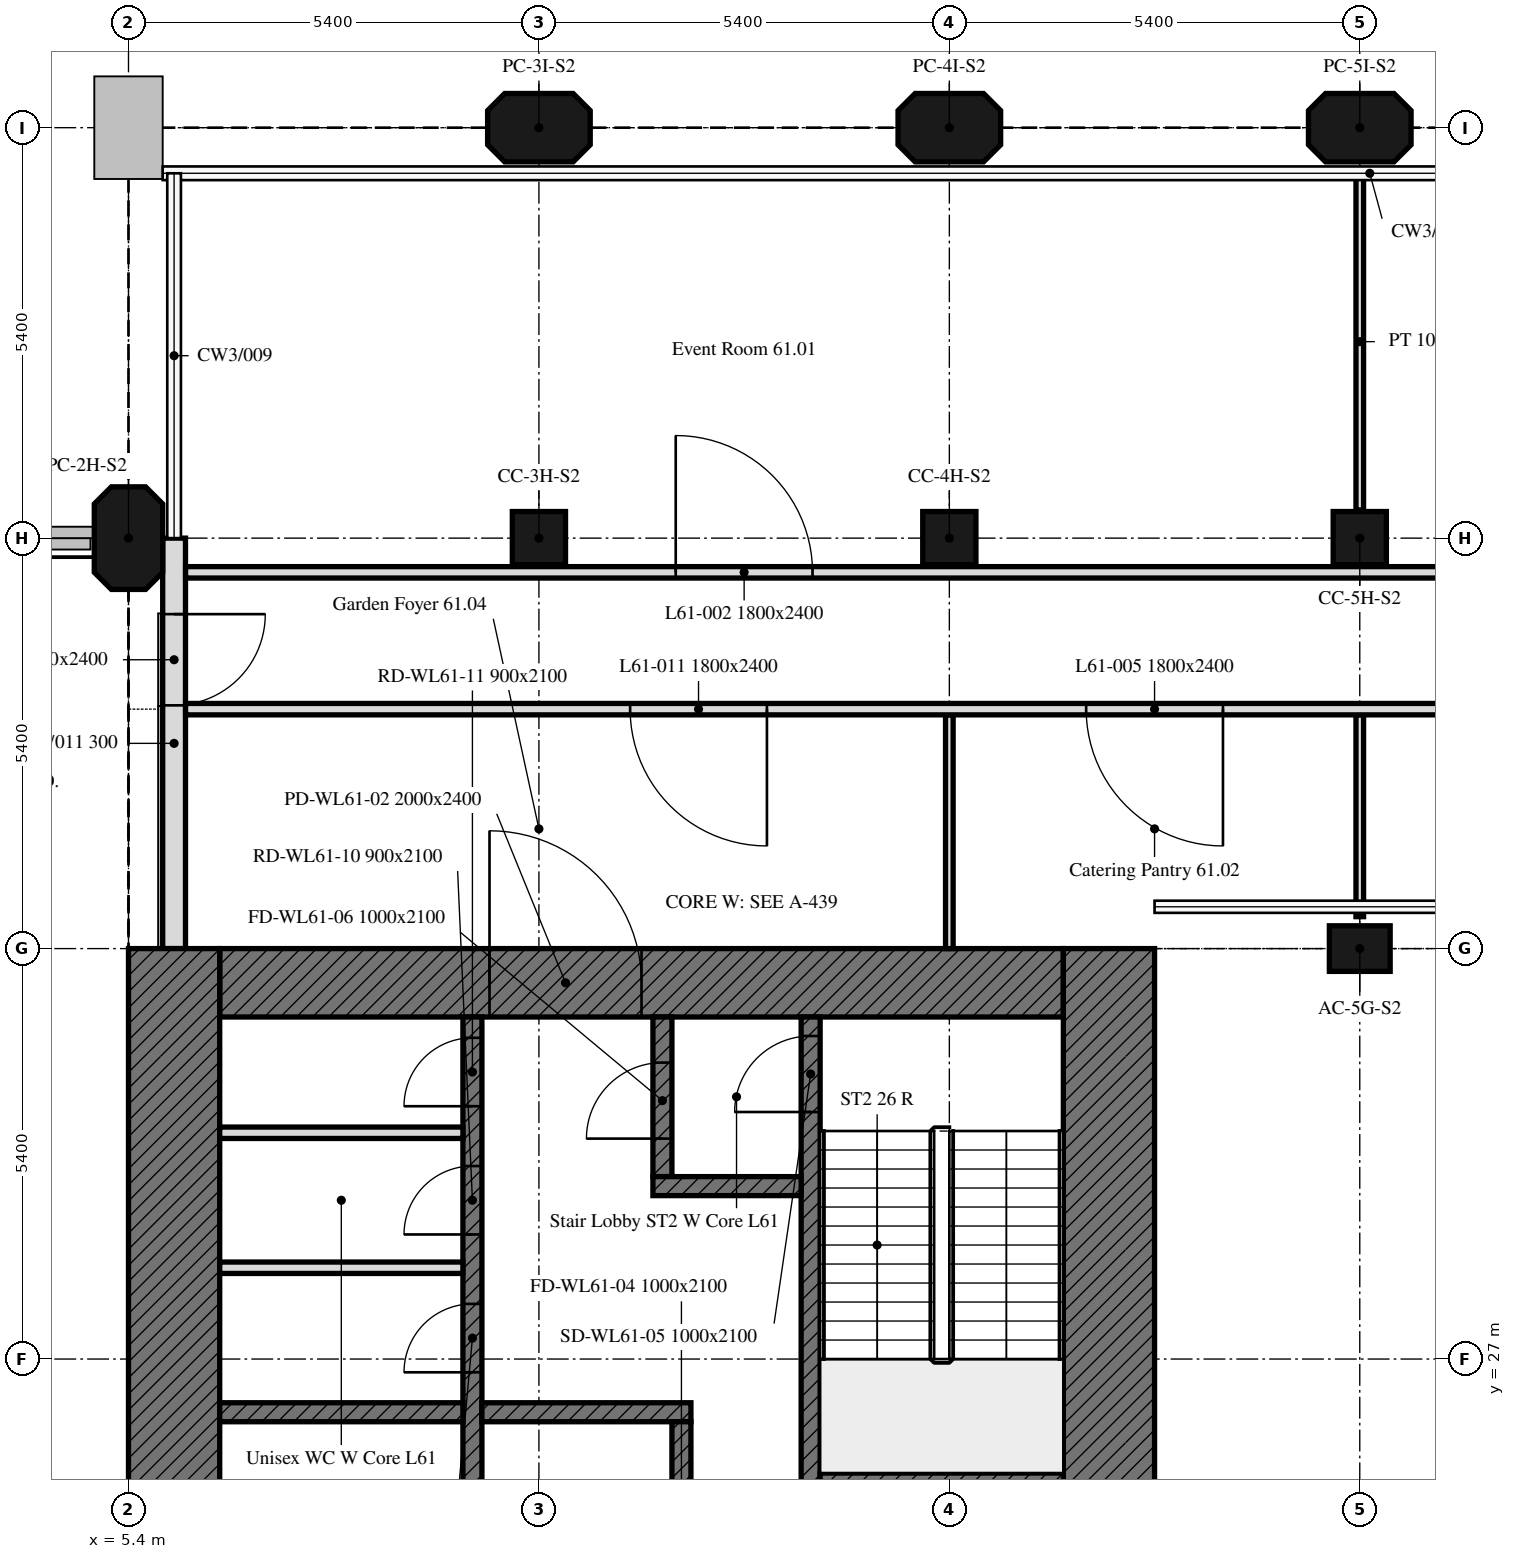
"""IFC4 building model, lengths in metres.
Left out: names, types, materials, properties, quantities, classifications, styles, units other than length and angle.
Written with IfcOpenShell. Run it as: python <this file> out.ifc"""

import sys

from ifc_helpers import new_model, si_unit, direction, frame, frame_2d, origin, origin_2d, place, context, subcontext, project, spatial, polyline, rectangle, outline, extrude, element, fill, save


model = new_model("IFC4")
c1 = context("Model", 3, precision=1e-05, world=origin(), true_north=direction((0.0, 1.0)))
c2 = subcontext(c1, "Body", "Model", "MODEL_VIEW")
j1 = project(units=[si_unit("LENGTHUNIT", "METRE"), si_unit("PLANEANGLEUNIT", "RADIAN")], contexts=[c1])
p1 = place(None, origin())
s1 = spatial("IfcSite", under=j1, at=p1, CompositionType="ELEMENT")
p2 = place(p1, origin())
s2 = spatial("IfcBuilding", under=s1, at=p2, CompositionType="ELEMENT")
p3 = place(p2, frame((0.0, 0.0, 250.9)))
s3 = spatial("IfcBuildingStorey", under=s2, at=p3, CompositionType="ELEMENT", Elevation=250.9)
p4 = place(p3, frame((21.6, 32.4, 0.0), z_axis=(0.0, 0.0, 1.0), x_axis=(1.0, 0.0, 0.0)))
e1 = element("IfcColumn", 1, at=p4, inside=s3, PredefinedType="COLUMN", context=c2, shape_type="SweptSolid", body=[
    extrude(rectangle(XDim=0.8, YDim=0.6, at=origin_2d()), origin(), (0.0, 0.0, 1.0), 4.5),
])
p5 = place(p3, frame((5.4, 37.8, 0.0), z_axis=(0.0, 0.0, 1.0), x_axis=(0.0, 1.0, 0.0)))
e2 = element("IfcColumn", 2, at=p5, inside=s3, PredefinedType="COLUMN", context=c2, shape_type="SweptSolid", body=[
    extrude(outline(polyline([(-0.45, -0.45), (0.45, -0.45), (0.675, -0.225), (0.675, 0.225), (0.45, 0.45), (-0.45, 0.45), (-0.675, 0.225), (-0.675, -0.225), (-0.45, -0.45)])), origin(), (0.0, 0.0, 1.0), 4.5),
])
for number, where, z_axis, x_axis in (
    (3, (10.8, 37.8, 0.0), (0.0, 0.0, 1.0), (1.0, 0.0, 0.0)),
    (4, (16.2, 37.8, 0.0), (0.0, 0.0, 1.0), (1.0, 0.0, 0.0)),
    (5, (21.6, 37.8, 0.0), (0.0, 0.0, 1.0), (1.0, 0.0, 0.0)),
):
    element("IfcColumn", number, at=place(p3, frame(where, z_axis=z_axis, x_axis=x_axis)), inside=s3, PredefinedType="COLUMN", context=c2, shape_type="SweptSolid", body=[
        extrude(rectangle(XDim=0.7, YDim=0.7, at=origin_2d()), origin(), (0.0, 0.0, 1.0), 4.5),
    ])
for number, where, z_axis, x_axis in (
    (6, (10.8, 43.2, 0.0), (0.0, 0.0, 1.0), (1.0, 0.0, 0.0)),
    (7, (16.2, 43.2, 0.0), (0.0, 0.0, 1.0), (1.0, 0.0, 0.0)),
    (8, (21.6, 43.2, 0.0), (0.0, 0.0, 1.0), (1.0, 0.0, 0.0)),
):
    element("IfcColumn", number, at=place(p3, frame(where, z_axis=z_axis, x_axis=x_axis)), inside=s3, PredefinedType="COLUMN", context=c2, shape_type="SweptSolid", body=[
        extrude(outline(polyline([(-0.45, -0.45), (0.45, -0.45), (0.675, -0.225), (0.675, 0.225), (0.45, 0.45), (-0.45, 0.45), (-0.675, 0.225), (-0.675, -0.225), (-0.45, -0.45)])), origin(), (0.0, 0.0, 1.0), 4.5),
    ])
p6 = place(p3, frame((6.0, 37.8, 0.0), z_axis=(0.0, 0.0, 1.0), x_axis=(0.0, -1.0, 0.0)))
e9 = element("IfcWall", 9, at=p6, inside=s3, PredefinedType="SOLIDWALL", context=c2, shape_type="SweptSolid", body=[
    extrude(rectangle(XDim=5.4, YDim=0.3, at=frame_2d((2.7, 0.0))), origin(), (0.0, 0.0, 1.0), 4.5),
])
p7 = place(p6, frame((1.0, 0.0, 0.0)))
e10 = element("IfcOpeningElement", 10, at=p7, cuts=e9, PredefinedType="OPENING", context=c2, shape_type="SweptSolid", body=[
    extrude(rectangle(XDim=1.2, YDim=2.4, at=frame_2d((0.6, 1.2))), frame((0.0, 0.16, 0.0), z_axis=(0.0, -1.0, 0.0), x_axis=(1.0, 0.0, 0.0)), (0.0, 0.0, 1.0), 0.32),
])
p8 = place(p3, frame((6.6, 31.95, 0.0), z_axis=(0.0, 0.0, 1.0), x_axis=(1.0, 0.0, 0.0)))
e11 = element("IfcWall", 11, at=p8, inside=s3, PredefinedType="SOLIDWALL", context=c2, shape_type="SweptSolid", body=[
    extrude(rectangle(XDim=11.1, YDim=0.9, at=frame_2d((5.55, 0.0))), origin(), (0.0, 0.0, 1.0), 4.5),
])
p9 = place(p8, frame((3.55, 0.0, 0.0)))
e12 = element("IfcOpeningElement", 12, at=p9, cuts=e11, PredefinedType="OPENING", context=c2, shape_type="SweptSolid", body=[
    extrude(rectangle(XDim=2.0, YDim=2.4, at=frame_2d((1.0, 1.2))), frame((0.0, 0.45, 0.0), z_axis=(0.0, -1.0, 0.0), x_axis=(1.0, 0.0, 0.0)), (0.0, 0.0, 1.0), 0.9),
])
for number, where, z_axis, x_axis in (
    (13, (6.0, 16.2, 0.0), (0.0, 0.0, 1.0), (0.0, 1.0, 0.0)),
    (14, (18.3, 32.4, 0.0), (0.0, 0.0, 1.0), (0.0, -1.0, 0.0)),
):
    element("IfcWall", number, at=place(p3, frame(where, z_axis=z_axis, x_axis=x_axis)), inside=s3, PredefinedType="SOLIDWALL", context=c2, shape_type="SweptSolid", body=[
        extrude(rectangle(XDim=16.2, YDim=1.2, at=frame_2d((8.1, 0.0))), origin(), (0.0, 0.0, 1.0), 4.5),
    ])
p10 = place(p3, frame((9.925, 17.1, 0.0), z_axis=(0.0, 0.0, 1.0), x_axis=(0.0, 1.0, 0.0)))
e15 = element("IfcWall", 15, at=p10, inside=s3, PredefinedType="SOLIDWALL", context=c2, shape_type="SweptSolid", body=[
    extrude(rectangle(XDim=14.4, YDim=0.25, at=frame_2d((7.2, 0.0))), origin(), (0.0, 0.0, 1.0), 4.5),
])
p11 = place(p10, frame((4.6, 0.0, 0.0)))
e16 = element("IfcOpeningElement", 16, at=p11, cuts=e15, PredefinedType="OPENING", context=c2, shape_type="SweptSolid", body=[
    extrude(rectangle(XDim=1.0, YDim=2.1, at=frame_2d((0.5, 1.05))), frame((0.0, 0.125, 0.0), z_axis=(0.0, -1.0, 0.0), x_axis=(1.0, 0.0, 0.0)), (0.0, 0.0, 1.0), 0.25),
])
p12 = place(p10, frame((7.062, 0.0, 0.0)))
e17 = element("IfcOpeningElement", 17, at=p12, cuts=e15, PredefinedType="OPENING", context=c2, shape_type="SweptSolid", body=[
    extrude(rectangle(XDim=1.2, YDim=2.1, at=frame_2d((0.6, 1.05))), frame((0.0, 0.125, 0.0), z_axis=(0.0, -1.0, 0.0), x_axis=(1.0, 0.0, 0.0)), (0.0, 0.0, 1.0), 0.25),
])
p13 = place(p10, frame((9.726, 0.0, 0.0)))
e18 = element("IfcOpeningElement", 18, at=p13, cuts=e15, PredefinedType="OPENING", context=c2, shape_type="SweptSolid", body=[
    extrude(rectangle(XDim=0.9, YDim=2.1, at=frame_2d((0.45, 1.05))), frame((0.0, 0.125, 0.0), z_axis=(0.0, -1.0, 0.0), x_axis=(1.0, 0.0, 0.0)), (0.0, 0.0, 1.0), 0.25),
])
p14 = place(p10, frame((11.539, 0.0, 0.0)))
e19 = element("IfcOpeningElement", 19, at=p14, cuts=e15, PredefinedType="OPENING", context=c2, shape_type="SweptSolid", body=[
    extrude(rectangle(XDim=0.9, YDim=2.1, at=frame_2d((0.45, 1.05))), frame((0.0, 0.125, 0.0), z_axis=(0.0, -1.0, 0.0), x_axis=(1.0, 0.0, 0.0)), (0.0, 0.0, 1.0), 0.25),
])
p15 = place(p10, frame((13.226, 0.0, 0.0)))
e20 = element("IfcOpeningElement", 20, at=p15, cuts=e15, PredefinedType="OPENING", context=c2, shape_type="SweptSolid", body=[
    extrude(rectangle(XDim=0.9, YDim=2.1, at=frame_2d((0.45, 1.05))), frame((0.0, 0.125, 0.0), z_axis=(0.0, -1.0, 0.0), x_axis=(1.0, 0.0, 0.0)), (0.0, 0.0, 1.0), 0.25),
])
p16 = place(p3, frame((14.375, 17.1, 0.0), z_axis=(0.0, 0.0, 1.0), x_axis=(0.0, 1.0, 0.0)))
e21 = element("IfcWall", 21, at=p16, inside=s3, PredefinedType="SOLIDWALL", context=c2, shape_type="SweptSolid", body=[
    extrude(rectangle(XDim=14.4, YDim=0.25, at=frame_2d((7.2, 0.0))), origin(), (0.0, 0.0, 1.0), 4.5),
])
p17 = place(p16, frame((13.15, 0.0, 0.0)))
e22 = element("IfcOpeningElement", 22, at=p17, cuts=e21, PredefinedType="OPENING", context=c2, shape_type="SweptSolid", body=[
    extrude(rectangle(XDim=1.0, YDim=2.1, at=frame_2d((0.5, 1.05))), frame((0.0, 0.125, 0.0), z_axis=(0.0, -1.0, 0.0), x_axis=(1.0, 0.0, 0.0)), (0.0, 0.0, 1.0), 0.25),
])
p18 = place(p16, frame((3.15, 0.0, 0.0)))
e23 = element("IfcOpeningElement", 23, at=p18, cuts=e21, PredefinedType="OPENING", context=c2, shape_type="SweptSolid", body=[
    extrude(rectangle(XDim=1.1, YDim=2.1, at=frame_2d((0.55, 1.05))), frame((0.0, 0.125, 0.0), z_axis=(0.0, -1.0, 0.0), x_axis=(1.0, 0.0, 0.0)), (0.0, 0.0, 1.0), 0.25),
])
p19 = place(p16, frame((0.7, 0.0, 0.0)))
e24 = element("IfcOpeningElement", 24, at=p19, cuts=e21, PredefinedType="OPENING", context=c2, shape_type="SweptSolid", body=[
    extrude(rectangle(XDim=0.9, YDim=2.1, at=frame_2d((0.45, 1.05))), frame((0.0, 0.125, 0.0), z_axis=(0.0, -1.0, 0.0), x_axis=(1.0, 0.0, 0.0)), (0.0, 0.0, 1.0), 0.25),
])
p20 = place(p16, frame((6.175, 0.0, 0.0)))
e25 = element("IfcOpeningElement", 25, at=p20, cuts=e21, PredefinedType="OPENING", context=c2, shape_type="SweptSolid", body=[
    extrude(rectangle(XDim=0.9, YDim=2.1, at=frame_2d((0.45, 1.05))), frame((0.0, 0.125, 0.0), z_axis=(0.0, -1.0, 0.0), x_axis=(1.0, 0.0, 0.0)), (0.0, 0.0, 1.0), 0.25),
])
for number, where, z_axis, x_axis in (
    (26, (14.5, 25.375, 0.0), (0.0, 0.0, 1.0), (1.0, 0.0, 0.0)),
    (27, (6.6, 26.3, 0.0), (0.0, 0.0, 1.0), (1.0, 0.0, 0.0)),
):
    element("IfcWall", number, at=place(p3, frame(where, z_axis=z_axis, x_axis=x_axis)), inside=s3, PredefinedType="SOLIDWALL", context=c2, shape_type="SweptSolid", body=[
        extrude(rectangle(XDim=3.2, YDim=0.25, at=frame_2d((1.6, 0.0))), origin(), (0.0, 0.0, 1.0), 4.5),
    ])
p21 = place(p3, frame((10.05, 26.3, 0.0), z_axis=(0.0, 0.0, 1.0), x_axis=(1.0, 0.0, 0.0)))
e28 = element("IfcWall", 28, at=p21, inside=s3, PredefinedType="SOLIDWALL", context=c2, shape_type="SweptSolid", body=[
    extrude(rectangle(XDim=2.75, YDim=0.25, at=frame_2d((1.375, 0.0))), origin(), (0.0, 0.0, 1.0), 4.5),
])
p22 = place(p3, frame((12.425, 29.4, 0.0), z_axis=(0.0, 0.0, 1.0), x_axis=(0.0, 1.0, 0.0)))
e29 = element("IfcWall", 29, at=p22, inside=s3, PredefinedType="SOLIDWALL", context=c2, shape_type="SweptSolid", body=[
    extrude(rectangle(XDim=2.1, YDim=0.25, at=frame_2d((1.05, 0.0))), origin(), (0.0, 0.0, 1.0), 4.5),
])
p23 = place(p22, frame((0.5, 0.0, 0.0)))
e30 = element("IfcOpeningElement", 30, at=p23, cuts=e29, PredefinedType="OPENING", context=c2, shape_type="SweptSolid", body=[
    extrude(rectangle(XDim=1.0, YDim=2.1, at=frame_2d((0.5, 1.05))), frame((0.0, 0.125, 0.0), z_axis=(0.0, -1.0, 0.0), x_axis=(1.0, 0.0, 0.0)), (0.0, 0.0, 1.0), 0.25),
])
p24 = place(p3, frame((12.3, 29.275, 0.0), z_axis=(0.0, 0.0, 1.0), x_axis=(1.0, 0.0, 0.0)))
e31 = element("IfcWall", 31, at=p24, inside=s3, PredefinedType="SOLIDWALL", context=c2, shape_type="SweptSolid", body=[
    extrude(rectangle(XDim=1.95, YDim=0.25, at=frame_2d((0.975, 0.0))), origin(), (0.0, 0.0, 1.0), 4.5),
])
p25 = place(p3, frame((12.675, 20.55, 0.0), z_axis=(0.0, 0.0, 1.0), x_axis=(0.0, 1.0, 0.0)))
e32 = element("IfcWall", 32, at=p25, inside=s3, PredefinedType="SOLIDWALL", context=c2, shape_type="SweptSolid", body=[
    extrude(rectangle(XDim=5.625, YDim=0.25, at=frame_2d((2.812, 0.0))), origin(), (0.0, 0.0, 1.0), 4.5),
])
p26 = place(p25, frame((2.95, 0.0, 0.0)))
e33 = element("IfcOpeningElement", 33, at=p26, cuts=e32, PredefinedType="OPENING", context=c2, shape_type="SweptSolid", body=[
    extrude(rectangle(XDim=1.0, YDim=2.1, at=frame_2d((0.5, 1.05))), frame((0.0, 0.125, 0.0), z_axis=(0.0, -1.0, 0.0), x_axis=(1.0, 0.0, 0.0)), (0.0, 0.0, 1.0), 0.25),
])
for number, where, z_axis, x_axis in (
    (34, (6.6, 28.201, 0.0), (0.0, 0.0, 1.0), (1.0, 0.0, 0.0)),
    (35, (6.6, 29.977, 0.0), (0.0, 0.0, 1.0), (1.0, 0.0, 0.0)),
):
    element("IfcWall", number, at=place(p3, frame(where, z_axis=z_axis, x_axis=x_axis)), inside=s3, PredefinedType="PARTITIONING", context=c2, shape_type="SweptSolid", body=[
        extrude(rectangle(XDim=3.2, YDim=0.15, at=frame_2d((1.6, 0.0))), origin(), (0.0, 0.0, 1.0), 4.5),
    ])
p27 = place(p3, frame((21.6, 42.6, 0.0), z_axis=(0.0, 0.0, 1.0), x_axis=(0.0, -1.0, 0.0)))
e36 = element("IfcWall", 36, at=p27, inside=s3, PredefinedType="PARTITIONING", context=c2, shape_type="SweptSolid", body=[
    extrude(rectangle(XDim=4.43, YDim=0.1, at=frame_2d((2.215, 0.0))), origin(), (0.0, 0.0, 1.0), 3.75),
])
p28 = place(p3, frame((6.151, 37.35, 0.0), z_axis=(0.0, 0.0, 1.0), x_axis=(1.0, 0.0, 0.0)))
e37 = element("IfcWall", 37, at=p28, inside=s3, PredefinedType="PARTITIONING", context=c2, shape_type="SweptSolid", body=[
    extrude(rectangle(XDim=31.198, YDim=0.15, at=frame_2d((15.599, 0.0))), origin(), (0.0, 0.0, 1.0), 3.75),
])
p29 = place(p28, frame((6.449, 0.0, 0.0)))
e38 = element("IfcOpeningElement", 38, at=p29, cuts=e37, PredefinedType="OPENING", context=c2, shape_type="SweptSolid", body=[
    extrude(rectangle(XDim=1.8, YDim=2.4, at=frame_2d((0.9, 1.2))), frame((0.0, 0.075, 0.0), z_axis=(0.0, -1.0, 0.0), x_axis=(1.0, 0.0, 0.0)), (0.0, 0.0, 1.0), 0.15),
])
p30 = place(p3, frame((21.6, 35.475, 0.0), z_axis=(0.0, 0.0, 1.0), x_axis=(0.0, -1.0, 0.0)))
e39 = element("IfcWall", 39, at=p30, inside=s3, PredefinedType="PARTITIONING", context=c2, shape_type="SweptSolid", body=[
    extrude(rectangle(XDim=2.655, YDim=0.1, at=frame_2d((1.328, 0.0))), origin(), (0.0, 0.0, 1.0), 3.75),
])
p31 = place(p3, frame((16.2, 35.475, 0.0), z_axis=(0.0, 0.0, 1.0), x_axis=(0.0, -1.0, 0.0)))
e40 = element("IfcWall", 40, at=p31, inside=s3, PredefinedType="PARTITIONING", context=c2, shape_type="SweptSolid", body=[
    extrude(rectangle(XDim=3.075, YDim=0.1, at=frame_2d((1.538, 0.0))), origin(), (0.0, 0.0, 1.0), 3.75),
])
p32 = place(p3, frame((42.6, 35.55, 0.0), z_axis=(0.0, 0.0, 1.0), x_axis=(-1.0, 0.0, 0.0)))
e41 = element("IfcWall", 41, at=p32, inside=s3, PredefinedType="PARTITIONING", context=c2, shape_type="SweptSolid", body=[
    extrude(rectangle(XDim=36.449, YDim=0.15, at=frame_2d((18.225, 0.0))), origin(), (0.0, 0.0, 1.0), 3.75),
])
p33 = place(p32, frame((12.0, 0.0, 0.0)))
e42 = element("IfcOpeningElement", 42, at=p33, cuts=e41, PredefinedType="OPENING", context=c2, shape_type="SweptSolid", body=[
    extrude(rectangle(XDim=1.8, YDim=2.4, at=frame_2d((0.9, 1.2))), frame((0.0, 0.075, 0.0), z_axis=(0.0, -1.0, 0.0), x_axis=(1.0, 0.0, 0.0)), (0.0, 0.0, 1.0), 0.15),
])
p34 = place(p32, frame((17.4, 0.0, 0.0)))
e43 = element("IfcOpeningElement", 43, at=p34, cuts=e41, PredefinedType="OPENING", context=c2, shape_type="SweptSolid", body=[
    extrude(rectangle(XDim=1.8, YDim=2.4, at=frame_2d((0.9, 1.2))), frame((0.0, 0.075, 0.0), z_axis=(0.0, -1.0, 0.0), x_axis=(1.0, 0.0, 0.0)), (0.0, 0.0, 1.0), 0.15),
])
p35 = place(p32, frame((22.8, 0.0, 0.0)))
e44 = element("IfcOpeningElement", 44, at=p35, cuts=e41, PredefinedType="OPENING", context=c2, shape_type="SweptSolid", body=[
    extrude(rectangle(XDim=1.8, YDim=2.4, at=frame_2d((0.9, 1.2))), frame((0.0, 0.075, 0.0), z_axis=(0.0, -1.0, 0.0), x_axis=(1.0, 0.0, 0.0)), (0.0, 0.0, 1.0), 0.15),
])
p36 = place(p32, frame((1.8, 0.0, 0.0)))
e45 = element("IfcOpeningElement", 45, at=p36, cuts=e41, PredefinedType="OPENING", context=c2, shape_type="SweptSolid", body=[
    extrude(rectangle(XDim=1.8, YDim=2.4, at=frame_2d((0.9, 1.2))), frame((0.0, 0.075, 0.0), z_axis=(0.0, -1.0, 0.0), x_axis=(1.0, 0.0, 0.0)), (0.0, 0.0, 1.0), 0.15),
])
p37 = place(p32, frame((28.8, 0.0, 0.0)))
e46 = element("IfcOpeningElement", 46, at=p37, cuts=e41, PredefinedType="OPENING", context=c2, shape_type="SweptSolid", body=[
    extrude(rectangle(XDim=1.8, YDim=2.4, at=frame_2d((0.9, 1.2))), frame((0.0, 0.075, 0.0), z_axis=(0.0, -1.0, 0.0), x_axis=(1.0, 0.0, 0.0)), (0.0, 0.0, 1.0), 0.15),
])
p38 = place(p7, origin())
e47 = element("IfcDoor", 47, at=p38, inside=s3, OperationType="SINGLE_SWING_LEFT", PredefinedType="DOOR", context=c2, shape_type="SweptSolid", body=[
    extrude(rectangle(XDim=1.2, YDim=2.4, at=frame_2d((0.6, 1.2))), frame((0.0, 0.025, 0.0), z_axis=(0.0, -1.0, 0.0), x_axis=(1.0, 0.0, 0.0)), (0.0, 0.0, 1.0), 0.05),
])
fill(e10, e47)
p39 = place(p9, origin())
e48 = element("IfcDoor", 48, at=p39, inside=s3, OperationType="DOUBLE_DOOR_SINGLE_SWING", PredefinedType="DOOR", context=c2, shape_type="SweptSolid", body=[
    extrude(rectangle(XDim=2.0, YDim=2.4, at=frame_2d((1.0, 1.2))), frame((0.0, 0.025, 0.0), z_axis=(0.0, -1.0, 0.0), x_axis=(1.0, 0.0, 0.0)), (0.0, 0.0, 1.0), 0.05),
])
fill(e12, e48)
p40 = place(p17, origin())
e49 = element("IfcDoor", 49, at=p40, inside=s3, OperationType="SINGLE_SWING_LEFT", PredefinedType="DOOR", context=c2, shape_type="SweptSolid", body=[
    extrude(rectangle(XDim=1.0, YDim=2.1, at=frame_2d((0.5, 1.05))), frame((0.0, 0.025, 0.0), z_axis=(0.0, -1.0, 0.0), x_axis=(1.0, 0.0, 0.0)), (0.0, 0.0, 1.0), 0.05),
])
fill(e22, e49)
p41 = place(p23, origin())
e50 = element("IfcDoor", 50, at=p41, inside=s3, OperationType="SINGLE_SWING_LEFT", PredefinedType="DOOR", context=c2, shape_type="SweptSolid", body=[
    extrude(rectangle(XDim=1.0, YDim=2.1, at=frame_2d((0.5, 1.05))), frame((0.0, 0.025, 0.0), z_axis=(0.0, -1.0, 0.0), x_axis=(1.0, 0.0, 0.0)), (0.0, 0.0, 1.0), 0.05),
])
fill(e30, e50)
p42 = place(p13, origin())
e51 = element("IfcDoor", 51, at=p42, inside=s3, OperationType="SINGLE_SWING_LEFT", PredefinedType="DOOR", context=c2, shape_type="SweptSolid", body=[
    extrude(rectangle(XDim=0.9, YDim=2.1, at=frame_2d((0.45, 1.05))), frame((0.0, 0.025, 0.0), z_axis=(0.0, -1.0, 0.0), x_axis=(1.0, 0.0, 0.0)), (0.0, 0.0, 1.0), 0.05),
])
fill(e18, e51)
p43 = place(p14, origin())
e52 = element("IfcDoor", 52, at=p43, inside=s3, OperationType="SINGLE_SWING_LEFT", PredefinedType="DOOR", context=c2, shape_type="SweptSolid", body=[
    extrude(rectangle(XDim=0.9, YDim=2.1, at=frame_2d((0.45, 1.05))), frame((0.0, 0.025, 0.0), z_axis=(0.0, -1.0, 0.0), x_axis=(1.0, 0.0, 0.0)), (0.0, 0.0, 1.0), 0.05),
])
fill(e19, e52)
p44 = place(p15, origin())
e53 = element("IfcDoor", 53, at=p44, inside=s3, OperationType="SINGLE_SWING_LEFT", PredefinedType="DOOR", context=c2, shape_type="SweptSolid", body=[
    extrude(rectangle(XDim=0.9, YDim=2.1, at=frame_2d((0.45, 1.05))), frame((0.0, 0.025, 0.0), z_axis=(0.0, -1.0, 0.0), x_axis=(1.0, 0.0, 0.0)), (0.0, 0.0, 1.0), 0.05),
])
fill(e20, e53)
p45 = place(p29, origin())
e54 = element("IfcDoor", 54, at=p45, inside=s3, OperationType="DOUBLE_DOOR_SINGLE_SWING", PredefinedType="DOOR", context=c2, shape_type="SweptSolid", body=[
    extrude(rectangle(XDim=1.8, YDim=2.4, at=frame_2d((0.9, 1.2))), frame((0.0, 0.025, 0.0), z_axis=(0.0, -1.0, 0.0), x_axis=(1.0, 0.0, 0.0)), (0.0, 0.0, 1.0), 0.05),
])
fill(e38, e54)
p46 = place(p35, origin())
e55 = element("IfcDoor", 55, at=p46, inside=s3, OperationType="DOUBLE_DOOR_SINGLE_SWING", PredefinedType="DOOR", context=c2, shape_type="SweptSolid", body=[
    extrude(rectangle(XDim=1.8, YDim=2.4, at=frame_2d((0.9, 1.2))), frame((0.0, 0.025, 0.0), z_axis=(0.0, -1.0, 0.0), x_axis=(1.0, 0.0, 0.0)), (0.0, 0.0, 1.0), 0.05),
])
fill(e44, e55)
p47 = place(p37, origin())
e56 = element("IfcDoor", 56, at=p47, inside=s3, OperationType="DOUBLE_DOOR_SINGLE_SWING", PredefinedType="DOOR", context=c2, shape_type="SweptSolid", body=[
    extrude(rectangle(XDim=1.8, YDim=2.4, at=frame_2d((0.9, 1.2))), frame((0.0, 0.025, 0.0), z_axis=(0.0, -1.0, 0.0), x_axis=(1.0, 0.0, 0.0)), (0.0, 0.0, 1.0), 0.05),
])
fill(e46, e56)
save(model, sys.argv[1])
